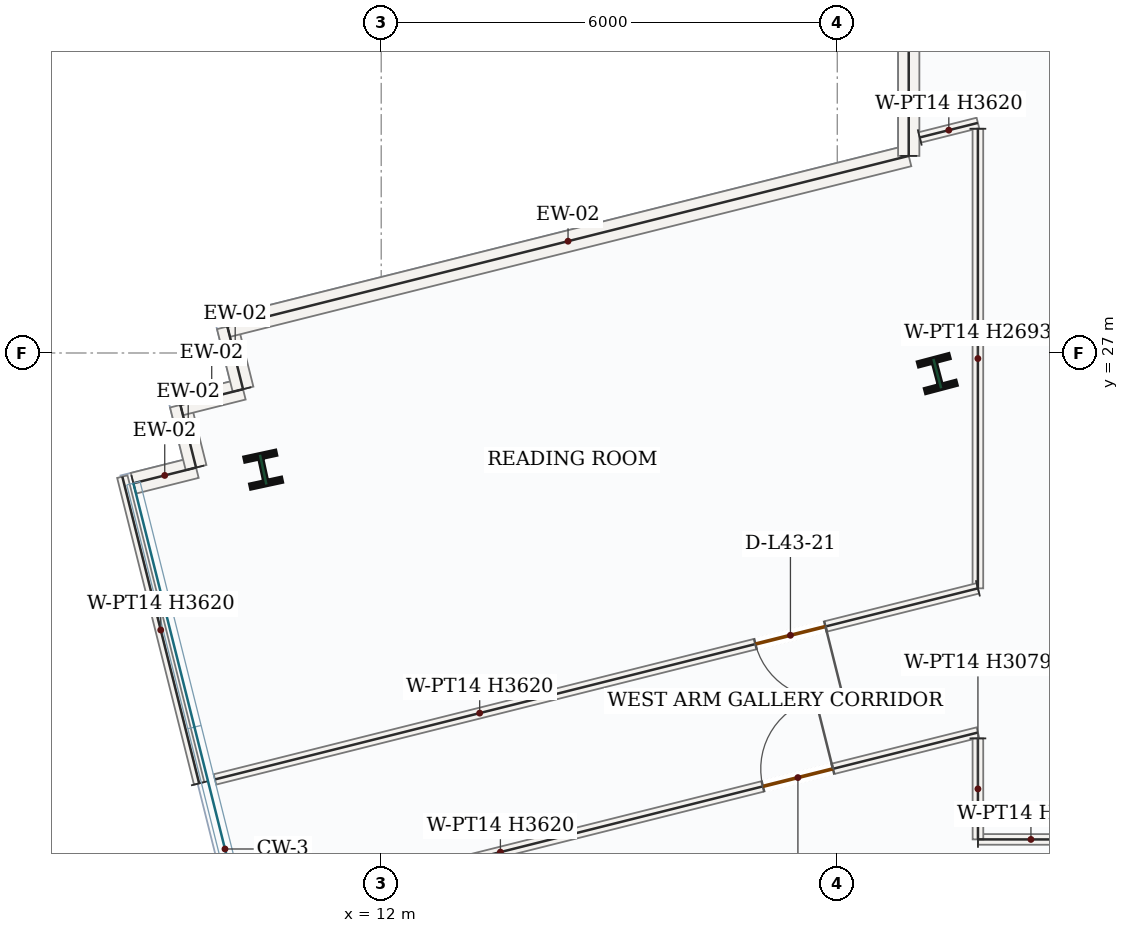
"""IFC4 building model, lengths in metres.
Left out: names, types, materials, properties, quantities, classifications, styles, units other than length and angle.
Written with IfcOpenShell. Run it as: python <this file> out.ifc"""

import sys

from ifc_helpers import new_model, si_unit, direction, frame, frame_2d, origin, origin_2d, place, context, subcontext, project, spatial, rectangle, i_section, extrude, source, transform, mapped, element, fill, save


model = new_model("IFC4")
c1 = context("Model", 3, precision=1e-05, world=origin(), true_north=direction((0.0, 1.0)))
c2 = subcontext(c1, "Body", "Model", "MODEL_VIEW")
j1 = project(units=[si_unit("LENGTHUNIT", "METRE"), si_unit("PLANEANGLEUNIT", "RADIAN")], contexts=[c1])
p1 = place(None, origin())
s1 = spatial("IfcSite", under=j1, at=p1, CompositionType="ELEMENT")
p2 = place(p1, origin())
s2 = spatial("IfcBuilding", under=s1, at=p2, CompositionType="ELEMENT")
p3 = place(p2, frame((0.0, 0.0, 186.3)))
s3 = spatial("IfcBuildingStorey", under=s2, at=p3, CompositionType="ELEMENT", Elevation=186.3)
m1 = source(origin(), c2, "Body", "SweptSolid", [
    extrude(i_section(OverallWidth=0.404, OverallDepth=0.407, WebThickness=0.027, FlangeThickness=0.044, FilletRadius=0.018, at=origin_2d()), origin(), (0.0, 0.0, 1.0), 3.9),
])
for number, where, z_axis, x_axis in (
    (1, (19.316, 26.729, 0.0), (0.0, 0.0, 1.0), (0.967, 0.255, 0.0)),
    (2, (10.447, 25.465, 0.0), (0.0, 0.0, 1.0), (0.977, 0.211, 0.0)),
):
    element("IfcColumn", number, at=place(p3, frame(where, z_axis=z_axis, x_axis=x_axis)), inside=s3, PredefinedType="COLUMN", context=c2, shape_type="MappedRepresentation", body=[
        mapped(m1, transform((0.0, 0.0, 0.0), x_axis=(1.0, 0.0, 0.0), y_axis=(0.0, 1.0, 0.0), z_axis=(0.0, 0.0, 1.0), scale=1.0)),
    ])
m2 = source(origin(), c2, "Body", "SweptSolid", [
    extrude(rectangle(XDim=0.85, YDim=0.28, at=frame_2d((0.425, 0.0))), origin(), (0.0, 0.0, 1.0), 3.62),
])
for number, where, z_axis, x_axis in (
    (3, (8.74, 25.286, 0.0), (0.0, 0.0, 1.0), (0.97, 0.243, 0.0)),
    (4, (9.564, 25.493, 0.0), (0.0, 0.0, 1.0), (-0.243, 0.97, 0.0)),
):
    element("IfcWall", number, at=place(p3, frame(where, z_axis=z_axis, x_axis=x_axis)), inside=s3, PredefinedType="SOLIDWALL", context=c2, shape_type="MappedRepresentation", body=[
        mapped(m2, transform((0.0, 0.0, 0.0), x_axis=(1.0, 0.0, 0.0), y_axis=(0.0, 1.0, 0.0), z_axis=(0.0, 0.0, 1.0), scale=1.0)),
    ])
m3 = source(origin(), c2, "Body", "SweptSolid", [
    extrude(rectangle(XDim=0.85, YDim=0.28, at=frame_2d((0.425, 0.0))), origin(), (0.0, 0.0, 1.0), 3.62),
])
p4 = place(p3, frame((9.358, 26.317, 0.0), z_axis=(0.0, 0.0, 1.0), x_axis=(0.970041063326, 0.242941012307, 0.0)))
e5 = element("IfcWall", 5, at=p4, inside=s3, PredefinedType="SOLIDWALL", context=c2, shape_type="MappedRepresentation", body=[
    mapped(m3, transform((0.0, 0.0, 0.0), x_axis=(1.0, 0.0, 0.0), y_axis=(0.0, 1.0, 0.0), z_axis=(0.0, 0.0, 1.0), scale=1.0)),
])
p5 = place(p3, frame((10.182, 26.524, 0.0), z_axis=(0.0, 0.0, 1.0), x_axis=(-0.243008704507, 0.970024107708, 0.0)))
e6 = element("IfcWall", 6, at=p5, inside=s3, PredefinedType="SOLIDWALL", context=c2, shape_type="MappedRepresentation", body=[
    mapped(m2, transform((0.0, 0.0, 0.0), x_axis=(1.0, 0.0, 0.0), y_axis=(0.0, 1.0, 0.0), z_axis=(0.0, 0.0, 1.0), scale=1.0)),
])
m4 = source(origin(), c2, "Body", "SweptSolid", [
    extrude(rectangle(XDim=9.241, YDim=0.28, at=frame_2d((4.621, 0.0))), origin(), (0.0, 0.0, 1.0), 3.62),
])
p6 = place(p3, frame((9.976, 27.348, 0.0), z_axis=(0.0, 0.0, 1.0), x_axis=(0.970044513566, 0.242927235402, 0.0)))
e7 = element("IfcWall", 7, at=p6, inside=s3, PredefinedType="SOLIDWALL", context=c2, shape_type="MappedRepresentation", body=[
    mapped(m4, transform((0.0, 0.0, 0.0), x_axis=(1.0, 0.0, 0.0), y_axis=(0.0, 1.0, 0.0), z_axis=(0.0, 0.0, 1.0), scale=1.0)),
])
m5 = source(origin(), c2, "Body", "SweptSolid", [
    extrude(rectangle(XDim=5.949, YDim=0.28, at=frame_2d((2.975, 0.0))), origin(), (0.0, 0.0, 1.0), 3.62),
])
p7 = place(p3, frame((18.94, 29.593, 0.0), z_axis=(0.0, 0.0, 1.0), x_axis=(0.0, 1.0, 0.0)))
e8 = element("IfcWall", 8, at=p7, inside=s3, PredefinedType="SOLIDWALL", context=c2, shape_type="MappedRepresentation", body=[
    mapped(m5, transform((0.0, 0.0, 0.0), x_axis=(1.0, 0.0, 0.0), y_axis=(0.0, 1.0, 0.0), z_axis=(0.0, 0.0, 1.0), scale=1.0)),
])
m6 = source(origin(), c2, "Body", "SweptSolid", [
    extrude(rectangle(XDim=1.394, YDim=0.14, at=frame_2d((0.697, 0.0))), origin(), (0.0, 0.0, 1.0), 3.62),
])
p8 = place(p3, frame((19.851, 20.601, 0.0), z_axis=(0.0, 0.0, 1.0), x_axis=(0.999999754632, -0.000700525222, 0.0)))
e9 = element("IfcWall", 9, at=p8, inside=s3, PredefinedType="PARTITIONING", context=c2, shape_type="MappedRepresentation", body=[
    mapped(m6, transform((0.0, 0.0, 0.0), x_axis=(1.0, 0.0, 0.0), y_axis=(0.0, 1.0, 0.0), z_axis=(0.0, 0.0, 1.0), scale=1.0)),
])
p9 = place(p3, frame((10.26, 19.605, 0.0), z_axis=(0.0, 0.0, 1.0), x_axis=(0.970042179759, 0.242936554451, 0.0)))
e10 = element("IfcWall", 10, at=p9, inside=s3, PredefinedType="PARTITIONING", context=c2, shape_type="SweptSolid", body=[
    extrude(rectangle(XDim=9.886, YDim=0.14, at=frame_2d((4.943, 0.0))), origin(), (0.0, 0.0, 1.0), 3.62),
])
p10 = place(p9, frame((6.97, 0.0, 0.0)))
e11 = element("IfcOpeningElement", 11, at=p10, cuts=e10, PredefinedType="OPENING", context=c2, shape_type="SweptSolid", body=[
    extrude(rectangle(XDim=0.95, YDim=2.15, at=frame_2d((0.475, 1.075))), frame((0.0, 0.08, 0.0), z_axis=(0.0, -1.0, 0.0), x_axis=(1.0, 0.0, 0.0)), (0.0, 0.0, 1.0), 0.16),
])
m7 = source(origin(), c2, "Body", "SweptSolid", [
    extrude(rectangle(XDim=1.329, YDim=0.14, at=frame_2d((0.664, 0.0))), origin(), (0.0, 0.0, 1.0), 3.079),
])
p11 = place(p3, frame((19.85, 21.93, 0.0), z_axis=(0.0, 0.0, 1.0), x_axis=(0.00073502369, -0.99999972987, 0.0)))
e12 = element("IfcWall", 12, at=p11, inside=s3, PredefinedType="PARTITIONING", context=c2, shape_type="MappedRepresentation", body=[
    mapped(m7, transform((0.0, 0.0, 0.0), x_axis=(1.0, 0.0, 0.0), y_axis=(0.0, 1.0, 0.0), z_axis=(0.0, 0.0, 1.0), scale=1.0)),
])
m8 = source(origin(), c2, "Body", "SweptSolid", [
    extrude(rectangle(XDim=4.16, YDim=0.14, at=frame_2d((2.08, 0.0))), origin(), (0.0, 0.0, 1.0), 3.62),
])
p12 = place(p3, frame((9.605, 21.338, 0.0), z_axis=(0.0, 0.0, 1.0), x_axis=(-0.242963670411, 0.970035388458, 0.0)))
e13 = element("IfcWall", 13, at=p12, inside=s3, PredefinedType="PARTITIONING", context=c2, shape_type="MappedRepresentation", body=[
    mapped(m8, transform((0.0, 0.0, 0.0), x_axis=(1.0, 0.0, 0.0), y_axis=(0.0, 1.0, 0.0), z_axis=(0.0, 0.0, 1.0), scale=1.0)),
])
m9 = source(origin(), c2, "Body", "SweptSolid", [
    extrude(rectangle(XDim=0.789, YDim=0.14, at=frame_2d((0.395, 0.0))), origin(), (0.0, 0.0, 1.0), 3.62),
])
p13 = place(p3, frame((19.085, 29.836, 0.0), z_axis=(0.0, 0.0, 1.0), x_axis=(0.970033159667, 0.242972568711, 0.0)))
e14 = element("IfcWall", 14, at=p13, inside=s3, PredefinedType="PARTITIONING", context=c2, shape_type="MappedRepresentation", body=[
    mapped(m9, transform((0.0, 0.0, 0.0), x_axis=(1.0, 0.0, 0.0), y_axis=(0.0, 1.0, 0.0), z_axis=(0.0, 0.0, 1.0), scale=1.0)),
])
m10 = source(origin(), c2, "Body", "SweptSolid", [
    extrude(rectangle(XDim=6.046, YDim=0.14, at=frame_2d((3.023, 0.0))), origin(), (0.0, 0.0, 1.0), 2.693),
])
p14 = place(p3, frame((19.85, 29.95, 0.0), z_axis=(0.0, 0.0, 1.0), x_axis=(0.0, -1.0, 0.0)))
e15 = element("IfcWall", 15, at=p14, inside=s3, PredefinedType="PARTITIONING", context=c2, shape_type="MappedRepresentation", body=[
    mapped(m10, transform((0.0, 0.0, 0.0), x_axis=(1.0, 0.0, 0.0), y_axis=(0.0, 1.0, 0.0), z_axis=(0.0, 0.0, 1.0), scale=1.0)),
])
p15 = place(p3, frame((19.85, 23.904, 0.0), z_axis=(0.0, 0.0, 1.0), x_axis=(-0.97004665335, -0.24291869077, 0.0)))
e16 = element("IfcWall", 16, at=p15, inside=s3, PredefinedType="PARTITIONING", context=c2, shape_type="SweptSolid", body=[
    extrude(rectangle(XDim=10.347, YDim=0.14, at=frame_2d((5.173, 0.0))), origin(), (0.0, 0.0, 1.0), 3.62),
])
p16 = place(p15, frame((2.067, 0.0, 0.0)))
e17 = element("IfcOpeningElement", 17, at=p16, cuts=e16, PredefinedType="OPENING", context=c2, shape_type="SweptSolid", body=[
    extrude(rectangle(XDim=0.95, YDim=2.15, at=frame_2d((0.475, 1.075))), frame((0.0, 0.08, 0.0), z_axis=(0.0, -1.0, 0.0), x_axis=(1.0, 0.0, 0.0)), (0.0, 0.0, 1.0), 0.16),
])
m11 = source(origin(), c2, "Body", "SweptSolid", [
    extrude(rectangle(XDim=0.95, YDim=2.15, at=frame_2d((0.475, 1.075))), frame((0.0, 0.025, 0.0), z_axis=(0.0, -1.0, 0.0), x_axis=(1.0, 0.0, 0.0)), (0.0, 0.0, 1.0), 0.05),
])
p17 = place(p16, origin())
e18 = element("IfcDoor", 18, at=p17, inside=s3, OperationType="SINGLE_SWING_LEFT", PredefinedType="DOOR", context=c2, shape_type="MappedRepresentation", body=[
    mapped(m11, transform((0.0, 0.0, 0.0), x_axis=(1.0, 0.0, 0.0), y_axis=(0.0, 1.0, 0.0), z_axis=(0.0, 0.0, 1.0), scale=1.0)),
])
fill(e17, e18)
p18 = place(p10, origin())
e19 = element("IfcDoor", 19, at=p18, inside=s3, OperationType="SINGLE_SWING_RIGHT", PredefinedType="DOOR", context=c2, shape_type="MappedRepresentation", body=[
    mapped(m11, transform((0.0, 0.0, 0.0), x_axis=(1.0, 0.0, 0.0), y_axis=(0.0, 1.0, 0.0), z_axis=(0.0, 0.0, 1.0), scale=1.0)),
])
fill(e11, e19)
save(model, sys.argv[1])
